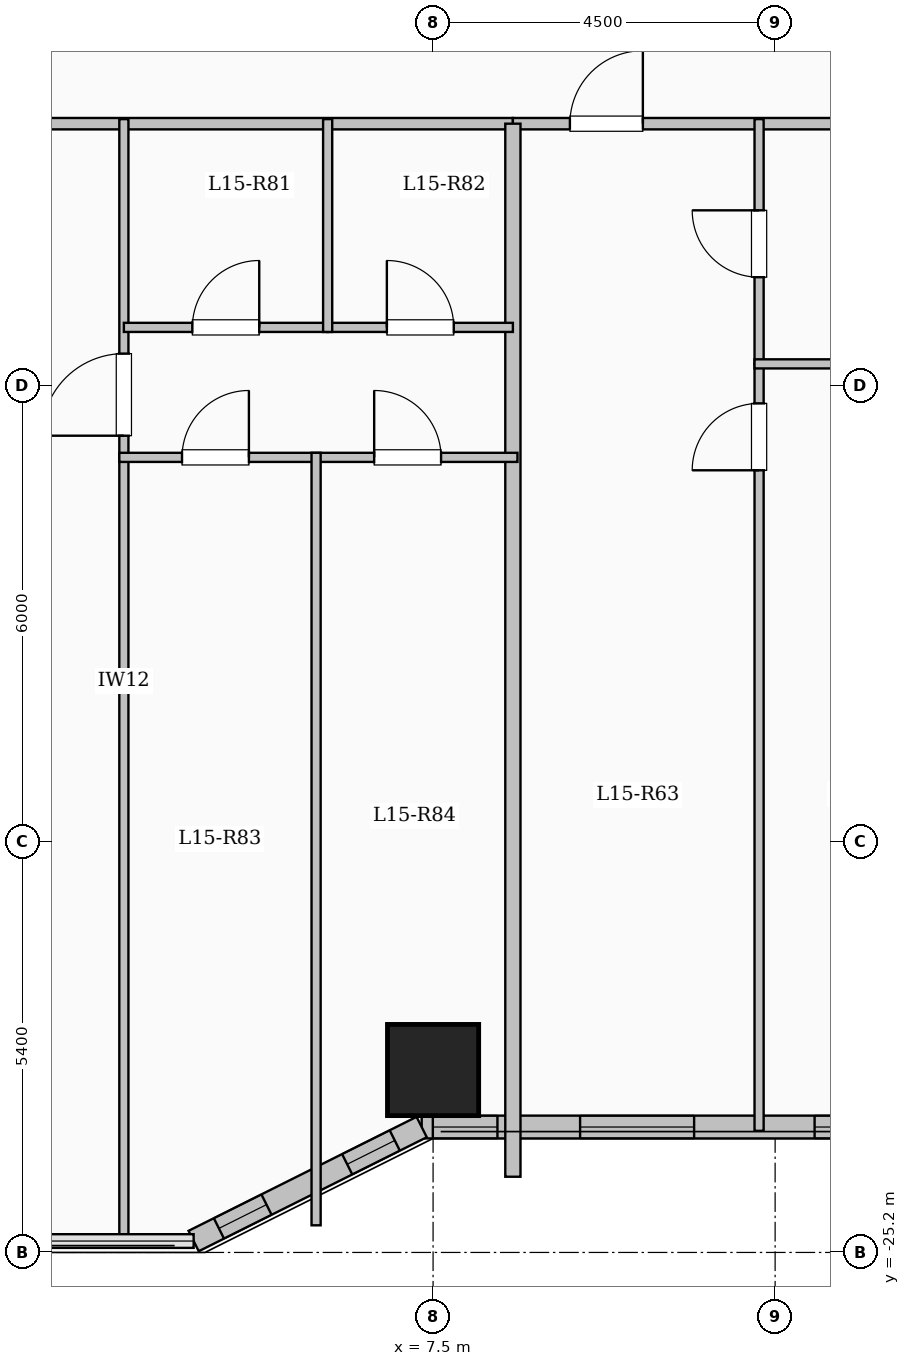
"""IFC4 building model, lengths in metres.
Left out: names, types, materials, properties, quantities, classifications, styles, units other than length and angle.
Written with IfcOpenShell. Run it as: python <this file> out.ifc"""

import sys

from ifc_helpers import new_model, si_unit, direction, frame, frame_2d, origin, origin_2d, place, context, subcontext, project, spatial, rectangle, extrude, element, fill, save


model = new_model("IFC4")
c1 = context("Model", 3, precision=1e-05, world=origin(), true_north=direction((0.0, 1.0)))
c2 = subcontext(c1, "Body", "Model", "MODEL_VIEW")
j1 = project(units=[si_unit("LENGTHUNIT", "METRE"), si_unit("PLANEANGLEUNIT", "RADIAN")], contexts=[c1])
p1 = place(None, origin())
s1 = spatial("IfcSite", under=j1, at=p1, CompositionType="ELEMENT")
p2 = place(p1, origin())
s2 = spatial("IfcBuilding", under=s1, at=p2, CompositionType="ELEMENT")
p3 = place(p2, frame((0.0, 0.0, 57.5)))
s3 = spatial("IfcBuildingStorey", under=s2, at=p3, CompositionType="ELEMENT", Elevation=57.5)
p4 = place(p3, frame((7.5, -22.8, 0.0), z_axis=(0.0, 0.0, 1.0), x_axis=(1.0, 0.0, 0.0)))
e1 = element("IfcColumn", 1, at=p4, inside=s3, PredefinedType="COLUMN", context=c2, shape_type="SweptSolid", body=[
    extrude(rectangle(XDim=1.2, YDim=1.2, at=origin_2d()), origin(), (0.0, 0.0, 1.0), 3.35),
])
p5 = place(p3, frame((22.65, -23.55, 0.0), z_axis=(0.0, 0.0, 1.0), x_axis=(-1.0, 0.0, 0.0)))
e2 = element("IfcWall", 2, at=p5, inside=s3, PredefinedType="SOLIDWALL", context=c2, shape_type="SweptSolid", body=[
    extrude(rectangle(XDim=15.3, YDim=0.3, at=frame_2d((7.65, 0.0))), origin(), (0.0, 0.0, 1.0), 3.1),
])
p6 = place(p5, frame((0.321, 0.0, 0.95)))
e3 = element("IfcOpeningElement", 3, at=p6, cuts=e2, PredefinedType="OPENING", context=c2, shape_type="SweptSolid", body=[
    extrude(rectangle(XDim=1.0, YDim=1.5, at=frame_2d((0.5, 0.75))), frame((0.0, 0.16, 0.0), z_axis=(0.0, -1.0, 0.0), x_axis=(1.0, 0.0, 0.0)), (0.0, 0.0, 1.0), 0.32),
])
p7 = place(p5, frame((2.031, 0.0, 0.95)))
e4 = element("IfcOpeningElement", 4, at=p7, cuts=e2, PredefinedType="OPENING", context=c2, shape_type="SweptSolid", body=[
    extrude(rectangle(XDim=0.85, YDim=1.5, at=frame_2d((0.425, 0.75))), frame((0.0, 0.16, 0.0), z_axis=(0.0, -1.0, 0.0), x_axis=(1.0, 0.0, 0.0)), (0.0, 0.0, 1.0), 0.32),
])
p8 = place(p5, frame((3.562, 0.0, 0.95)))
e5 = element("IfcOpeningElement", 5, at=p8, cuts=e2, PredefinedType="OPENING", context=c2, shape_type="SweptSolid", body=[
    extrude(rectangle(XDim=0.85, YDim=1.5, at=frame_2d((0.425, 0.75))), frame((0.0, 0.16, 0.0), z_axis=(0.0, -1.0, 0.0), x_axis=(1.0, 0.0, 0.0)), (0.0, 0.0, 1.0), 0.32),
])
p9 = place(p5, frame((5.571, 0.0, 0.9)))
e6 = element("IfcOpeningElement", 6, at=p9, cuts=e2, PredefinedType="OPENING", context=c2, shape_type="SweptSolid", body=[
    extrude(rectangle(XDim=1.5, YDim=1.65, at=frame_2d((0.75, 0.825))), frame((0.0, 0.16, 0.0), z_axis=(0.0, -1.0, 0.0), x_axis=(1.0, 0.0, 0.0)), (0.0, 0.0, 1.0), 0.32),
])
p10 = place(p5, frame((8.631, 0.0, 0.9)))
e7 = element("IfcOpeningElement", 7, at=p10, cuts=e2, PredefinedType="OPENING", context=c2, shape_type="SweptSolid", body=[
    extrude(rectangle(XDim=1.5, YDim=1.65, at=frame_2d((0.75, 0.825))), frame((0.0, 0.16, 0.0), z_axis=(0.0, -1.0, 0.0), x_axis=(1.0, 0.0, 0.0)), (0.0, 0.0, 1.0), 0.32),
])
p11 = place(p5, frame((11.716, 0.0, 0.9)))
e8 = element("IfcOpeningElement", 8, at=p11, cuts=e2, PredefinedType="OPENING", context=c2, shape_type="SweptSolid", body=[
    extrude(rectangle(XDim=1.5, YDim=1.65, at=frame_2d((0.75, 0.825))), frame((0.0, 0.16, 0.0), z_axis=(0.0, -1.0, 0.0), x_axis=(1.0, 0.0, 0.0)), (0.0, 0.0, 1.0), 0.32),
])
p12 = place(p5, frame((14.303, 0.0, 0.95)))
e9 = element("IfcOpeningElement", 9, at=p12, cuts=e2, PredefinedType="OPENING", context=c2, shape_type="SweptSolid", body=[
    extrude(rectangle(XDim=0.85, YDim=1.5, at=frame_2d((0.425, 0.75))), frame((0.0, 0.16, 0.0), z_axis=(0.0, -1.0, 0.0), x_axis=(1.0, 0.0, 0.0)), (0.0, 0.0, 1.0), 0.32),
])
p13 = place(p3, frame((7.35, -23.55, 0.0), z_axis=(0.0, 0.0, 1.0), x_axis=(-0.894427191, -0.4472135955, 0.0)))
e10 = element("IfcWall", 10, at=p13, inside=s3, PredefinedType="SOLIDWALL", context=c2, shape_type="SweptSolid", body=[
    extrude(rectangle(XDim=3.354, YDim=0.3, at=frame_2d((1.677, 0.0))), origin(), (0.0, 0.0, 1.0), 3.1),
])
p14 = place(p13, frame((0.396, 0.0, 0.95)))
e11 = element("IfcOpeningElement", 11, at=p14, cuts=e10, PredefinedType="OPENING", context=c2, shape_type="SweptSolid", body=[
    extrude(rectangle(XDim=0.7, YDim=1.5, at=frame_2d((0.35, 0.75))), frame((0.0, 0.16, 0.0), z_axis=(0.0, -1.0, 0.0), x_axis=(1.0, 0.0, 0.0)), (0.0, 0.0, 1.0), 0.32),
])
p15 = place(p13, frame((2.282, 0.0, 0.95)))
e12 = element("IfcOpeningElement", 12, at=p15, cuts=e10, PredefinedType="OPENING", context=c2, shape_type="SweptSolid", body=[
    extrude(rectangle(XDim=0.7, YDim=1.5, at=frame_2d((0.35, 0.75))), frame((0.0, 0.16, 0.0), z_axis=(0.0, -1.0, 0.0), x_axis=(1.0, 0.0, 0.0)), (0.0, 0.0, 1.0), 0.32),
])
p16 = place(p3, frame((-8.55, -10.35, 0.0), z_axis=(0.0, 0.0, 1.0), x_axis=(1.0, 0.0, 0.0)))
e13 = element("IfcWall", 13, at=p16, inside=s3, PredefinedType="PARTITIONING", context=c2, shape_type="SweptSolid", body=[
    extrude(rectangle(XDim=17.1, YDim=0.15, at=frame_2d((8.55, 0.0))), origin(), (0.0, 0.0, 1.0), 3.1),
])
p17 = place(p16, frame((0.8, 0.0, 0.0)))
e14 = element("IfcOpeningElement", 14, at=p17, cuts=e13, PredefinedType="OPENING", context=c2, shape_type="SweptSolid", body=[
    extrude(rectangle(XDim=0.96, YDim=2.15, at=frame_2d((0.48, 1.075))), frame((0.0, 0.085, 0.0), z_axis=(0.0, -1.0, 0.0), x_axis=(1.0, 0.0, 0.0)), (0.0, 0.0, 1.0), 0.17),
])
p18 = place(p16, frame((9.35, 0.0, 0.0)))
e15 = element("IfcOpeningElement", 15, at=p18, cuts=e13, PredefinedType="OPENING", context=c2, shape_type="SweptSolid", body=[
    extrude(rectangle(XDim=0.96, YDim=2.15, at=frame_2d((0.48, 1.075))), frame((0.0, 0.085, 0.0), z_axis=(0.0, -1.0, 0.0), x_axis=(1.0, 0.0, 0.0)), (0.0, 0.0, 1.0), 0.17),
])
p19 = place(p3, frame((8.55, -10.35, 0.0), z_axis=(0.0, 0.0, 1.0), x_axis=(1.0, 0.0, 0.0)))
e16 = element("IfcWall", 16, at=p19, inside=s3, PredefinedType="PARTITIONING", context=c2, shape_type="SweptSolid", body=[
    extrude(rectangle(XDim=14.0, YDim=0.15, at=frame_2d((7.0, 0.0))), origin(), (0.0, 0.0, 1.0), 3.1),
])
p20 = place(p19, frame((0.75, 0.0, 0.0)))
e17 = element("IfcOpeningElement", 17, at=p20, cuts=e16, PredefinedType="OPENING", context=c2, shape_type="SweptSolid", body=[
    extrude(rectangle(XDim=0.96, YDim=2.15, at=frame_2d((0.48, 1.075))), frame((0.0, 0.085, 0.0), z_axis=(0.0, -1.0, 0.0), x_axis=(1.0, 0.0, 0.0)), (0.0, 0.0, 1.0), 0.17),
])
p21 = place(p19, frame((6.888, 0.0, 0.0)))
e18 = element("IfcOpeningElement", 18, at=p21, cuts=e16, PredefinedType="OPENING", context=c2, shape_type="SweptSolid", body=[
    extrude(rectangle(XDim=0.96, YDim=2.15, at=frame_2d((0.48, 1.075))), frame((0.0, 0.085, 0.0), z_axis=(0.0, -1.0, 0.0), x_axis=(1.0, 0.0, 0.0)), (0.0, 0.0, 1.0), 0.17),
])
p22 = place(p3, frame((11.789, -23.6, 0.0), z_axis=(0.0, 0.0, 1.0), x_axis=(0.0, 1.0, 0.0)))
e19 = element("IfcWall", 19, at=p22, inside=s3, PredefinedType="PARTITIONING", context=c2, shape_type="SweptSolid", body=[
    extrude(rectangle(XDim=10.09, YDim=0.12, at=frame_2d((5.045, 0.0))), origin(), (0.0, 0.0, 1.0), 3.1),
])
p23 = place(p22, frame((8.69, 0.0, 0.0)))
e20 = element("IfcOpeningElement", 20, at=p23, cuts=e19, PredefinedType="OPENING", context=c2, shape_type="SweptSolid", body=[
    extrude(rectangle(XDim=0.88, YDim=2.1, at=frame_2d((0.44, 1.05))), frame((0.0, 0.07, 0.0), z_axis=(0.0, -1.0, 0.0), x_axis=(1.0, 0.0, 0.0)), (0.0, 0.0, 1.0), 0.14),
])
p24 = place(p3, frame((11.789, -13.51, 0.0), z_axis=(0.0, 0.0, 1.0), x_axis=(0.0, 1.0, 0.0)))
e21 = element("IfcWall", 21, at=p24, inside=s3, PredefinedType="PARTITIONING", context=c2, shape_type="SweptSolid", body=[
    extrude(rectangle(XDim=3.22, YDim=0.12, at=frame_2d((1.61, 0.0))), origin(), (0.0, 0.0, 1.0), 3.1),
])
p25 = place(p24, frame((1.14, 0.0, 0.0)))
e22 = element("IfcOpeningElement", 22, at=p25, cuts=e21, PredefinedType="OPENING", context=c2, shape_type="SweptSolid", body=[
    extrude(rectangle(XDim=0.88, YDim=2.1, at=frame_2d((0.44, 1.05))), frame((0.0, 0.07, 0.0), z_axis=(0.0, -1.0, 0.0), x_axis=(1.0, 0.0, 0.0)), (0.0, 0.0, 1.0), 0.14),
])
p26 = place(p3, frame((11.729, -13.51, 0.0), z_axis=(0.0, 0.0, 1.0), x_axis=(1.0, 0.0, 0.0)))
e23 = element("IfcWall", 23, at=p26, inside=s3, PredefinedType="PARTITIONING", context=c2, shape_type="SweptSolid", body=[
    extrude(rectangle(XDim=3.069, YDim=0.12, at=frame_2d((1.535, 0.0))), origin(), (0.0, 0.0, 1.0), 3.1),
])
p27 = place(p3, frame((8.55, -24.204, 0.0), z_axis=(0.0, 0.0, 1.0), x_axis=(0.0, 1.0, 0.0)))
e24 = element("IfcWall", 24, at=p27, inside=s3, PredefinedType="SOLIDWALL", context=c2, shape_type="SweptSolid", body=[
    extrude(rectangle(XDim=13.854, YDim=0.2, at=frame_2d((6.927, 0.0))), origin(), (0.0, 0.0, 1.0), 3.1),
])
p28 = place(p3, frame((3.432, -25.08, 0.0), z_axis=(0.0, 0.0, 1.0), x_axis=(0.0, 1.0, 0.0)))
e25 = element("IfcWall", 25, at=p28, inside=s3, PredefinedType="PARTITIONING", context=c2, shape_type="SweptSolid", body=[
    extrude(rectangle(XDim=14.79, YDim=0.12, at=frame_2d((7.395, 0.0))), origin(), (0.0, 0.0, 1.0), 3.1),
])
p29 = place(p28, frame((10.625, 0.0, 0.0)))
e26 = element("IfcOpeningElement", 26, at=p29, cuts=e25, PredefinedType="OPENING", context=c2, shape_type="SweptSolid", body=[
    extrude(rectangle(XDim=1.08, YDim=2.15, at=frame_2d((0.54, 1.075))), frame((0.0, 0.07, 0.0), z_axis=(0.0, -1.0, 0.0), x_axis=(1.0, 0.0, 0.0)), (0.0, 0.0, 1.0), 0.14),
])
p30 = place(p3, frame((3.432, -13.03, 0.0), z_axis=(0.0, 0.0, 1.0), x_axis=(1.0, 0.0, 0.0)))
e27 = element("IfcWall", 27, at=p30, inside=s3, PredefinedType="PARTITIONING", context=c2, shape_type="SweptSolid", body=[
    extrude(rectangle(XDim=2.681, YDim=0.12, at=frame_2d((1.341, 0.0))), origin(), (0.0, 0.0, 1.0), 2.585),
])
p31 = place(p30, frame((0.901, 0.0, 0.0)))
e28 = element("IfcOpeningElement", 28, at=p31, cuts=e27, PredefinedType="OPENING", context=c2, shape_type="SweptSolid", body=[
    extrude(rectangle(XDim=0.88, YDim=2.1, at=frame_2d((0.44, 1.05))), frame((0.0, 0.07, 0.0), z_axis=(0.0, -1.0, 0.0), x_axis=(1.0, 0.0, 0.0)), (0.0, 0.0, 1.0), 0.14),
])
p32 = place(p3, frame((6.113, -13.03, 0.0), z_axis=(0.0, 0.0, 1.0), x_axis=(1.0, 0.0, 0.0)))
e29 = element("IfcWall", 29, at=p32, inside=s3, PredefinedType="PARTITIONING", context=c2, shape_type="SweptSolid", body=[
    extrude(rectangle(XDim=2.437, YDim=0.12, at=frame_2d((1.219, 0.0))), origin(), (0.0, 0.0, 1.0), 2.585),
])
p33 = place(p32, frame((0.779, 0.0, 0.0)))
e30 = element("IfcOpeningElement", 30, at=p33, cuts=e29, PredefinedType="OPENING", context=c2, shape_type="SweptSolid", body=[
    extrude(rectangle(XDim=0.88, YDim=2.1, at=frame_2d((0.44, 1.05))), frame((0.0, 0.07, 0.0), z_axis=(0.0, -1.0, 0.0), x_axis=(1.0, 0.0, 0.0)), (0.0, 0.0, 1.0), 0.14),
])
p34 = place(p3, frame((3.372, -14.74, 0.0), z_axis=(0.0, 0.0, 1.0), x_axis=(1.0, 0.0, 0.0)))
e31 = element("IfcWall", 31, at=p34, inside=s3, PredefinedType="PARTITIONING", context=c2, shape_type="SweptSolid", body=[
    extrude(rectangle(XDim=5.238, YDim=0.12, at=frame_2d((2.619, 0.0))), origin(), (0.0, 0.0, 1.0), 2.585),
])
p35 = place(p34, frame((0.825, 0.0, 0.0)))
e32 = element("IfcOpeningElement", 32, at=p35, cuts=e31, PredefinedType="OPENING", context=c2, shape_type="SweptSolid", body=[
    extrude(rectangle(XDim=0.88, YDim=2.1, at=frame_2d((0.44, 1.05))), frame((0.0, 0.07, 0.0), z_axis=(0.0, -1.0, 0.0), x_axis=(1.0, 0.0, 0.0)), (0.0, 0.0, 1.0), 0.14),
])
p36 = place(p34, frame((3.353, 0.0, 0.0)))
e33 = element("IfcOpeningElement", 33, at=p36, cuts=e31, PredefinedType="OPENING", context=c2, shape_type="SweptSolid", body=[
    extrude(rectangle(XDim=0.88, YDim=2.1, at=frame_2d((0.44, 1.05))), frame((0.0, 0.07, 0.0), z_axis=(0.0, -1.0, 0.0), x_axis=(1.0, 0.0, 0.0)), (0.0, 0.0, 1.0), 0.14),
])
p37 = place(p3, frame((6.113, -13.09, 0.0), z_axis=(0.0, 0.0, 1.0), x_axis=(0.0, 1.0, 0.0)))
e34 = element("IfcWall", 34, at=p37, inside=s3, PredefinedType="PARTITIONING", context=c2, shape_type="SweptSolid", body=[
    extrude(rectangle(XDim=2.8, YDim=0.12, at=frame_2d((1.4, 0.0))), origin(), (0.0, 0.0, 1.0), 3.1),
])
p38 = place(p3, frame((5.961, -24.843, 0.0), z_axis=(0.0, 0.0, 1.0), x_axis=(0.0, 1.0, 0.0)))
e35 = element("IfcWall", 35, at=p38, inside=s3, PredefinedType="PARTITIONING", context=c2, shape_type="SweptSolid", body=[
    extrude(rectangle(XDim=10.163, YDim=0.12, at=frame_2d((5.082, 0.0))), origin(), (0.0, 0.0, 1.0), 3.1),
])
p39 = place(p10, origin())
e36 = element("IfcWindow", 36, at=p39, inside=s3, PartitioningType="SINGLE_PANEL", PredefinedType="WINDOW", context=c2, shape_type="SweptSolid", body=[
    extrude(rectangle(XDim=1.5, YDim=1.65, at=frame_2d((0.75, 0.825))), frame((0.0, 0.03, 0.0), z_axis=(0.0, -1.0, 0.0), x_axis=(1.0, 0.0, 0.0)), (0.0, 0.0, 1.0), 0.06),
])
fill(e7, e36)
p40 = place(p11, origin())
e37 = element("IfcWindow", 37, at=p40, inside=s3, PartitioningType="SINGLE_PANEL", PredefinedType="WINDOW", context=c2, shape_type="SweptSolid", body=[
    extrude(rectangle(XDim=1.5, YDim=1.65, at=frame_2d((0.75, 0.825))), frame((0.0, 0.03, 0.0), z_axis=(0.0, -1.0, 0.0), x_axis=(1.0, 0.0, 0.0)), (0.0, 0.0, 1.0), 0.06),
])
fill(e8, e37)
p41 = place(p12, origin())
e38 = element("IfcWindow", 38, at=p41, inside=s3, PartitioningType="SINGLE_PANEL", PredefinedType="WINDOW", context=c2, shape_type="SweptSolid", body=[
    extrude(rectangle(XDim=0.85, YDim=1.5, at=frame_2d((0.425, 0.75))), frame((0.0, 0.03, 0.0), z_axis=(0.0, -1.0, 0.0), x_axis=(1.0, 0.0, 0.0)), (0.0, 0.0, 1.0), 0.06),
])
fill(e9, e38)
p42 = place(p14, origin())
e39 = element("IfcWindow", 39, at=p42, inside=s3, PartitioningType="SINGLE_PANEL", PredefinedType="WINDOW", context=c2, shape_type="SweptSolid", body=[
    extrude(rectangle(XDim=0.7, YDim=1.5, at=frame_2d((0.35, 0.75))), frame((0.0, 0.03, 0.0), z_axis=(0.0, -1.0, 0.0), x_axis=(1.0, 0.0, 0.0)), (0.0, 0.0, 1.0), 0.06),
])
fill(e11, e39)
p43 = place(p15, origin())
e40 = element("IfcWindow", 40, at=p43, inside=s3, PartitioningType="SINGLE_PANEL", PredefinedType="WINDOW", context=c2, shape_type="SweptSolid", body=[
    extrude(rectangle(XDim=0.7, YDim=1.5, at=frame_2d((0.35, 0.75))), frame((0.0, 0.03, 0.0), z_axis=(0.0, -1.0, 0.0), x_axis=(1.0, 0.0, 0.0)), (0.0, 0.0, 1.0), 0.06),
])
fill(e12, e40)
p44 = place(p20, origin())
e41 = element("IfcDoor", 41, at=p44, inside=s3, OperationType="SINGLE_SWING_RIGHT", PredefinedType="DOOR", context=c2, shape_type="SweptSolid", body=[
    extrude(rectangle(XDim=0.96, YDim=2.15, at=frame_2d((0.48, 1.075))), frame((0.0, 0.025, 0.0), z_axis=(0.0, -1.0, 0.0), x_axis=(1.0, 0.0, 0.0)), (0.0, 0.0, 1.0), 0.05),
])
fill(e17, e41)
p45 = place(p23, origin())
e42 = element("IfcDoor", 42, at=p45, inside=s3, OperationType="SINGLE_SWING_LEFT", PredefinedType="DOOR", context=c2, shape_type="SweptSolid", body=[
    extrude(rectangle(XDim=0.88, YDim=2.1, at=frame_2d((0.44, 1.05))), frame((0.0, 0.025, 0.0), z_axis=(0.0, -1.0, 0.0), x_axis=(1.0, 0.0, 0.0)), (0.0, 0.0, 1.0), 0.05),
])
fill(e20, e42)
p46 = place(p25, origin())
e43 = element("IfcDoor", 43, at=p46, inside=s3, OperationType="SINGLE_SWING_RIGHT", PredefinedType="DOOR", context=c2, shape_type="SweptSolid", body=[
    extrude(rectangle(XDim=0.88, YDim=2.1, at=frame_2d((0.44, 1.05))), frame((0.0, 0.025, 0.0), z_axis=(0.0, -1.0, 0.0), x_axis=(1.0, 0.0, 0.0)), (0.0, 0.0, 1.0), 0.05),
])
fill(e22, e43)
p47 = place(p29, origin())
e44 = element("IfcDoor", 44, at=p47, inside=s3, OperationType="SINGLE_SWING_LEFT", PredefinedType="DOOR", context=c2, shape_type="SweptSolid", body=[
    extrude(rectangle(XDim=1.08, YDim=2.15, at=frame_2d((0.54, 1.075))), frame((0.0, 0.025, 0.0), z_axis=(0.0, -1.0, 0.0), x_axis=(1.0, 0.0, 0.0)), (0.0, 0.0, 1.0), 0.05),
])
fill(e26, e44)
p48 = place(p31, origin())
e45 = element("IfcDoor", 45, at=p48, inside=s3, OperationType="SINGLE_SWING_RIGHT", PredefinedType="DOOR", context=c2, shape_type="SweptSolid", body=[
    extrude(rectangle(XDim=0.88, YDim=2.1, at=frame_2d((0.44, 1.05))), frame((0.0, 0.025, 0.0), z_axis=(0.0, -1.0, 0.0), x_axis=(1.0, 0.0, 0.0)), (0.0, 0.0, 1.0), 0.05),
])
fill(e28, e45)
p49 = place(p33, origin())
e46 = element("IfcDoor", 46, at=p49, inside=s3, OperationType="SINGLE_SWING_LEFT", PredefinedType="DOOR", context=c2, shape_type="SweptSolid", body=[
    extrude(rectangle(XDim=0.88, YDim=2.1, at=frame_2d((0.44, 1.05))), frame((0.0, 0.025, 0.0), z_axis=(0.0, -1.0, 0.0), x_axis=(1.0, 0.0, 0.0)), (0.0, 0.0, 1.0), 0.05),
])
fill(e30, e46)
p50 = place(p35, origin())
e47 = element("IfcDoor", 47, at=p50, inside=s3, OperationType="SINGLE_SWING_RIGHT", PredefinedType="DOOR", context=c2, shape_type="SweptSolid", body=[
    extrude(rectangle(XDim=0.88, YDim=2.1, at=frame_2d((0.44, 1.05))), frame((0.0, 0.025, 0.0), z_axis=(0.0, -1.0, 0.0), x_axis=(1.0, 0.0, 0.0)), (0.0, 0.0, 1.0), 0.05),
])
fill(e32, e47)
p51 = place(p36, origin())
e48 = element("IfcDoor", 48, at=p51, inside=s3, OperationType="SINGLE_SWING_LEFT", PredefinedType="DOOR", context=c2, shape_type="SweptSolid", body=[
    extrude(rectangle(XDim=0.88, YDim=2.1, at=frame_2d((0.44, 1.05))), frame((0.0, 0.025, 0.0), z_axis=(0.0, -1.0, 0.0), x_axis=(1.0, 0.0, 0.0)), (0.0, 0.0, 1.0), 0.05),
])
fill(e33, e48)
save(model, sys.argv[1])
